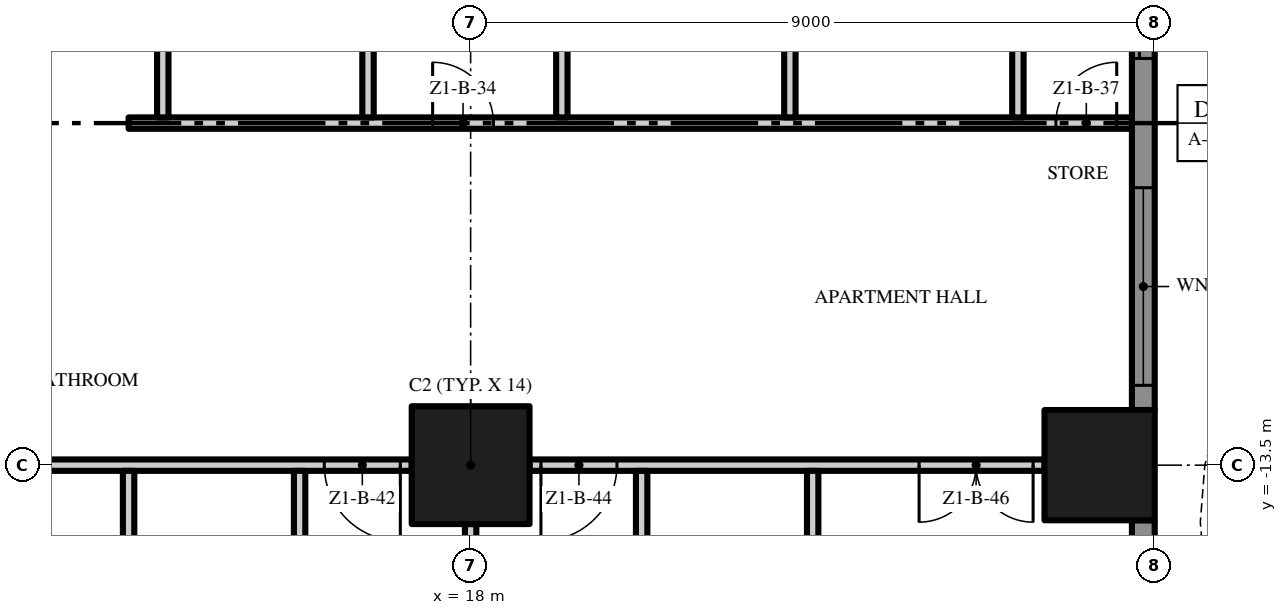
"""IFC4 building model, lengths in metres.
Left out: names, types, materials, properties, quantities, classifications, styles, units other than length and angle.
Written with IfcOpenShell. Run it as: python <this file> out.ifc"""

import sys

from ifc_helpers import new_model, si_unit, direction, frame, frame_2d, origin, origin_2d, place, context, subcontext, project, spatial, polyline, rectangle, outline, extrude, element, fill, save


model = new_model("IFC4")
c1 = context("Model", 3, precision=1e-05, world=origin(), true_north=direction((0.0, 1.0)))
c2 = subcontext(c1, "Body", "Model", "MODEL_VIEW")
j1 = project(units=[si_unit("LENGTHUNIT", "METRE"), si_unit("PLANEANGLEUNIT", "RADIAN")], contexts=[c1])
p1 = place(None, origin())
s1 = spatial("IfcSite", under=j1, at=p1, CompositionType="ELEMENT")
p2 = place(p1, origin())
s2 = spatial("IfcBuilding", under=s1, at=p2, CompositionType="ELEMENT")
p3 = place(p2, frame((0.0, 0.0, 30.2)))
s3 = spatial("IfcBuildingStorey", under=s2, at=p3, CompositionType="ELEMENT", Elevation=30.2)
p4 = place(p3, frame((18.0, -13.5, 0.0), z_axis=(0.0, 0.0, 1.0), x_axis=(1.0, 0.0, 0.0)))
e1 = element("IfcColumn", 1, at=p4, inside=s3, PredefinedType="COLUMN", context=c2, shape_type="SweptSolid", body=[
    extrude(rectangle(XDim=1.55, YDim=1.55, at=origin_2d()), origin(), (0.0, 0.0, 1.0), 3.5),
])
p5 = place(p3, frame((26.275, -13.5, 0.0), z_axis=(0.0, 0.0, 1.0), x_axis=(1.0, 0.0, 0.0)))
e2 = element("IfcColumn", 2, at=p5, inside=s3, PredefinedType="COLUMN", context=c2, shape_type="SweptSolid", body=[
    extrude(rectangle(XDim=1.45, YDim=1.45, at=origin_2d()), origin(), (0.0, 0.0, 1.0), 3.5),
])
p6 = place(p3, frame((26.85, -14.225, 0.0), z_axis=(0.0, 0.0, 1.0), x_axis=(0.0, -1.0, 0.0)))
e3 = element("IfcWall", 3, at=p6, inside=s3, PredefinedType="SOLIDWALL", context=c2, shape_type="SweptSolid", body=[
    extrude(rectangle(XDim=3.475, YDim=0.3, at=frame_2d((1.738, 0.0))), origin(), (0.0, 0.0, 1.0), 3.5),
])
p7 = place(p6, frame((0.325, 0.0, 0.45)))
e4 = element("IfcOpeningElement", 4, at=p7, cuts=e3, PredefinedType="OPENING", context=c2, shape_type="SweptSolid", body=[
    extrude(rectangle(XDim=2.6, YDim=2.65, at=frame_2d((1.3, 1.325))), frame((0.0, 0.16, 0.0), z_axis=(0.0, -1.0, 0.0), x_axis=(1.0, 0.0, 0.0)), (0.0, 0.0, 1.0), 0.32),
])
p8 = place(p3, frame((26.85, -5.225, 0.0), z_axis=(0.0, 0.0, 1.0), x_axis=(0.0, -1.0, 0.0)))
e5 = element("IfcWall", 5, at=p8, inside=s3, PredefinedType="SOLIDWALL", context=c2, shape_type="SweptSolid", body=[
    extrude(rectangle(XDim=7.55, YDim=0.3, at=frame_2d((3.775, 0.0))), origin(), (0.0, 0.0, 1.0), 3.5),
])
p9 = place(p8, frame((4.625, 0.0, 0.45)))
e6 = element("IfcOpeningElement", 6, at=p9, cuts=e5, PredefinedType="OPENING", context=c2, shape_type="SweptSolid", body=[
    extrude(rectangle(XDim=2.6, YDim=2.65, at=frame_2d((1.3, 1.325))), frame((0.0, 0.16, 0.0), z_axis=(0.0, -1.0, 0.0), x_axis=(1.0, 0.0, 0.0)), (0.0, 0.0, 1.0), 0.32),
])
p10 = place(p8, frame((0.325, 0.0, 0.0)))
e7 = element("IfcOpeningElement", 7, at=p10, cuts=e5, PredefinedType="OPENING", context=c2, shape_type="SweptSolid", body=[
    extrude(rectangle(XDim=2.6, YDim=2.4, at=frame_2d((1.3, 1.2))), frame((0.0, 0.16, 0.0), z_axis=(0.0, -1.0, 0.0), x_axis=(1.0, 0.0, 0.0)), (0.0, 0.0, 1.0), 0.32),
])
p11 = place(p3, origin())
e8 = element("IfcWall", 8, at=p11, inside=s3, PredefinedType="USERDEFINED", context=c2, shape_type="SweptSolid", body=[
    extrude(outline(polyline([(28.8, -18.0), (28.095, -16.5), (27.659, -15.0), (27.6, -14.25), (27.659, -13.5), (28.095, -12.0), (28.8, -10.5), (29.505, -9.0), (29.941, -7.5), (30.0, -6.75), (29.941, -6.0), (29.505, -4.5), (28.8, -3.0), (28.095, -1.5), (27.659, 0.0), (27.6, 0.75), (27.659, 1.5), (28.095, 3.0), (28.8, 4.5), (29.505, 6.0), (29.941, 7.5), (30.0, 8.25), (29.941, 9.0), (29.505, 10.5), (28.8, 12.0), (28.095, 13.5), (27.659, 15.0), (27.6, 15.75), (27.659, 16.5), (28.095, 18.0), (27.855, 18.07), (27.411, 16.545), (27.349, 15.75), (27.411, 14.955), (27.86, 13.411), (28.574, 11.894), (29.271, 10.411), (29.694, 8.955), (29.749, 8.25), (29.694, 7.545), (29.271, 6.089), (28.574, 4.606), (27.86, 3.089), (27.411, 1.545), (27.349, 0.75), (27.411, -0.045), (27.86, -1.589), (28.574, -3.106), (29.271, -4.589), (29.694, -6.045), (29.749, -6.75), (29.694, -7.455), (29.271, -8.911), (28.574, -10.394), (27.86, -11.911), (27.411, -13.455), (27.349, -14.25), (27.411, -15.045), (27.86, -16.589), (28.574, -18.106), (28.8, -18.0)])), origin(), (0.0, 0.0, 1.0), 0.9),
])
p12 = place(p3, frame((17.225, -13.5, 0.0), z_axis=(0.0, 0.0, 1.0), x_axis=(-1.0, 0.0, 0.0)))
e9 = element("IfcWall", 9, at=p12, inside=s3, PredefinedType="PARTITIONING", context=c2, shape_type="SweptSolid", body=[
    extrude(rectangle(XDim=7.45, YDim=0.15, at=frame_2d((3.725, 0.0))), origin(), (0.0, 0.0, 1.0), 3.5),
])
p13 = place(p12, frame((6.3, 0.0, 0.0)))
e10 = element("IfcOpeningElement", 10, at=p13, cuts=e9, PredefinedType="OPENING", context=c2, shape_type="SweptSolid", body=[
    extrude(rectangle(XDim=1.0, YDim=2.4, at=frame_2d((0.5, 1.2))), frame((0.0, 0.085, 0.0), z_axis=(0.0, -1.0, 0.0), x_axis=(1.0, 0.0, 0.0)), (0.0, 0.0, 1.0), 0.17),
])
p14 = place(p12, frame((0.15, 0.0, 0.0)))
e11 = element("IfcOpeningElement", 11, at=p14, cuts=e9, PredefinedType="OPENING", context=c2, shape_type="SweptSolid", body=[
    extrude(rectangle(XDim=1.0, YDim=2.4, at=frame_2d((0.5, 1.2))), frame((0.0, 0.085, 0.0), z_axis=(0.0, -1.0, 0.0), x_axis=(1.0, 0.0, 0.0)), (0.0, 0.0, 1.0), 0.17),
])
p15 = place(p3, frame((25.55, -13.5, 0.0), z_axis=(0.0, 0.0, 1.0), x_axis=(-1.0, 0.0, 0.0)))
e12 = element("IfcWall", 12, at=p15, inside=s3, PredefinedType="PARTITIONING", context=c2, shape_type="SweptSolid", body=[
    extrude(rectangle(XDim=6.775, YDim=0.15, at=frame_2d((3.388, 0.0))), origin(), (0.0, 0.0, 1.0), 3.5),
])
p16 = place(p15, frame((5.625, 0.0, 0.0)))
e13 = element("IfcOpeningElement", 13, at=p16, cuts=e12, PredefinedType="OPENING", context=c2, shape_type="SweptSolid", body=[
    extrude(rectangle(XDim=1.0, YDim=2.4, at=frame_2d((0.5, 1.2))), frame((0.0, 0.085, 0.0), z_axis=(0.0, -1.0, 0.0), x_axis=(1.0, 0.0, 0.0)), (0.0, 0.0, 1.0), 0.17),
])
p17 = place(p15, frame((0.15, 0.0, 0.0)))
e14 = element("IfcOpeningElement", 14, at=p17, cuts=e12, PredefinedType="OPENING", context=c2, shape_type="SweptSolid", body=[
    extrude(rectangle(XDim=1.5, YDim=2.4, at=frame_2d((0.75, 1.2))), frame((0.0, 0.085, 0.0), z_axis=(0.0, -1.0, 0.0), x_axis=(1.0, 0.0, 0.0)), (0.0, 0.0, 1.0), 0.17),
])
p18 = place(p3, frame((13.5, -9.0, 0.0), z_axis=(0.0, 0.0, 1.0), x_axis=(1.0, 0.0, 0.0)))
e15 = element("IfcWall", 15, at=p18, inside=s3, PredefinedType="PARTITIONING", context=c2, shape_type="SweptSolid", body=[
    extrude(rectangle(XDim=13.2, YDim=0.15, at=frame_2d((6.6, 0.0))), origin(), (0.0, 0.0, 1.0), 3.5),
])
p19 = place(p18, frame((4.0, 0.0, 0.0)))
e16 = element("IfcOpeningElement", 16, at=p19, cuts=e15, PredefinedType="OPENING", context=c2, shape_type="SweptSolid", body=[
    extrude(rectangle(XDim=0.8, YDim=2.0, at=frame_2d((0.4, 1.0))), frame((0.0, 0.085, 0.0), z_axis=(0.0, -1.0, 0.0), x_axis=(1.0, 0.0, 0.0)), (0.0, 0.0, 1.0), 0.17),
])
p20 = place(p18, frame((12.2, 0.0, 0.0)))
e17 = element("IfcOpeningElement", 17, at=p20, cuts=e15, PredefinedType="OPENING", context=c2, shape_type="SweptSolid", body=[
    extrude(rectangle(XDim=0.8, YDim=2.0, at=frame_2d((0.4, 1.0))), frame((0.0, 0.085, 0.0), z_axis=(0.0, -1.0, 0.0), x_axis=(1.0, 0.0, 0.0)), (0.0, 0.0, 1.0), 0.17),
])
p21 = place(p3, frame((13.5, -22.2, 0.0), z_axis=(0.0, 0.0, 1.0), x_axis=(0.0, 1.0, 0.0)))
e18 = element("IfcWall", 18, at=p21, inside=s3, PredefinedType="PARTITIONING", context=c2, shape_type="SweptSolid", body=[
    extrude(rectangle(XDim=8.625, YDim=0.15, at=frame_2d((4.312, 0.0))), origin(), (0.0, 0.0, 1.0), 3.5),
])
p22 = place(p3, frame((13.95, -8.925, 0.0), z_axis=(0.0, 0.0, 1.0), x_axis=(0.0, 1.0, 0.0)))
e19 = element("IfcWall", 19, at=p22, inside=s3, PredefinedType="PARTITIONING", context=c2, shape_type="SweptSolid", body=[
    extrude(rectangle(XDim=4.5, YDim=0.15, at=frame_2d((2.25, 0.0))), origin(), (0.0, 0.0, 1.0), 3.5),
])
p23 = place(p3, frame((15.75, -16.575, 0.0), z_axis=(0.0, 0.0, 1.0), x_axis=(0.0, 1.0, 0.0)))
e20 = element("IfcWall", 20, at=p23, inside=s3, PredefinedType="PARTITIONING", context=c2, shape_type="SweptSolid", body=[
    extrude(rectangle(XDim=3.0, YDim=0.15, at=frame_2d((1.5, 0.0))), origin(), (0.0, 0.0, 1.0), 3.5),
])
p24 = place(p3, frame((16.65, -8.925, 0.0), z_axis=(0.0, 0.0, 1.0), x_axis=(0.0, 1.0, 0.0)))
e21 = element("IfcWall", 21, at=p24, inside=s3, PredefinedType="PARTITIONING", context=c2, shape_type="SweptSolid", body=[
    extrude(rectangle(XDim=4.35, YDim=0.15, at=frame_2d((2.175, 0.0))), origin(), (0.0, 0.0, 1.0), 3.5),
])
p25 = place(p3, frame((18.0, -21.05, 0.0), z_axis=(0.0, 0.0, 1.0), x_axis=(0.0, 1.0, 0.0)))
e22 = element("IfcWall", 22, at=p25, inside=s3, PredefinedType="PARTITIONING", context=c2, shape_type="SweptSolid", body=[
    extrude(rectangle(XDim=6.775, YDim=0.15, at=frame_2d((3.388, 0.0))), origin(), (0.0, 0.0, 1.0), 3.5),
])
p26 = place(p3, frame((19.2, -8.925, 0.0), z_axis=(0.0, 0.0, 1.0), x_axis=(0.0, 1.0, 0.0)))
e23 = element("IfcWall", 23, at=p26, inside=s3, PredefinedType="PARTITIONING", context=c2, shape_type="SweptSolid", body=[
    extrude(rectangle(XDim=4.35, YDim=0.15, at=frame_2d((2.175, 0.0))), origin(), (0.0, 0.0, 1.0), 3.5),
])
p27 = place(p3, frame((20.25, -16.575, 0.0), z_axis=(0.0, 0.0, 1.0), x_axis=(0.0, 1.0, 0.0)))
e24 = element("IfcWall", 24, at=p27, inside=s3, PredefinedType="PARTITIONING", context=c2, shape_type="SweptSolid", body=[
    extrude(rectangle(XDim=3.0, YDim=0.15, at=frame_2d((1.5, 0.0))), origin(), (0.0, 0.0, 1.0), 3.5),
])
p28 = place(p3, frame((22.2, -8.925, 0.0), z_axis=(0.0, 0.0, 1.0), x_axis=(0.0, 1.0, 0.0)))
e25 = element("IfcWall", 25, at=p28, inside=s3, PredefinedType="PARTITIONING", context=c2, shape_type="SweptSolid", body=[
    extrude(rectangle(XDim=4.35, YDim=0.15, at=frame_2d((2.175, 0.0))), origin(), (0.0, 0.0, 1.0), 3.5),
])
p29 = place(p3, frame((22.5, -17.275, 0.0), z_axis=(0.0, 0.0, 1.0), x_axis=(0.0, 1.0, 0.0)))
e26 = element("IfcWall", 26, at=p29, inside=s3, PredefinedType="PARTITIONING", context=c2, shape_type="SweptSolid", body=[
    extrude(rectangle(XDim=3.7, YDim=0.15, at=frame_2d((1.85, 0.0))), origin(), (0.0, 0.0, 1.0), 3.5),
])
p30 = place(p3, frame((25.2, -8.925, 0.0), z_axis=(0.0, 0.0, 1.0), x_axis=(0.0, 1.0, 0.0)))
e27 = element("IfcWall", 27, at=p30, inside=s3, PredefinedType="PARTITIONING", context=c2, shape_type="SweptSolid", body=[
    extrude(rectangle(XDim=4.35, YDim=0.15, at=frame_2d((2.175, 0.0))), origin(), (0.0, 0.0, 1.0), 3.5),
])
p31 = place(p9, origin())
e28 = element("IfcWindow", 28, at=p31, inside=s3, PartitioningType="SINGLE_PANEL", PredefinedType="WINDOW", context=c2, shape_type="SweptSolid", body=[
    extrude(rectangle(XDim=2.6, YDim=2.65, at=frame_2d((1.3, 1.325))), frame((0.0, 0.03, 0.0), z_axis=(0.0, -1.0, 0.0), x_axis=(1.0, 0.0, 0.0)), (0.0, 0.0, 1.0), 0.06),
])
fill(e6, e28)
p32 = place(p10, origin())
e29 = element("IfcDoor", 29, at=p32, inside=s3, OperationType="SINGLE_SWING_LEFT", PredefinedType="DOOR", context=c2, shape_type="SweptSolid", body=[
    extrude(rectangle(XDim=2.6, YDim=2.4, at=frame_2d((1.3, 1.2))), frame((0.0, 0.025, 0.0), z_axis=(0.0, -1.0, 0.0), x_axis=(1.0, 0.0, 0.0)), (0.0, 0.0, 1.0), 0.05),
])
fill(e7, e29)
p33 = place(p19, origin())
e30 = element("IfcDoor", 30, at=p33, inside=s3, OperationType="SINGLE_SWING_LEFT", PredefinedType="DOOR", context=c2, shape_type="SweptSolid", body=[
    extrude(rectangle(XDim=0.8, YDim=2.0, at=frame_2d((0.4, 1.0))), frame((0.0, 0.025, 0.0), z_axis=(0.0, -1.0, 0.0), x_axis=(1.0, 0.0, 0.0)), (0.0, 0.0, 1.0), 0.05),
])
fill(e16, e30)
p34 = place(p20, origin())
e31 = element("IfcDoor", 31, at=p34, inside=s3, OperationType="SINGLE_SWING_RIGHT", PredefinedType="DOOR", context=c2, shape_type="SweptSolid", body=[
    extrude(rectangle(XDim=0.8, YDim=2.0, at=frame_2d((0.4, 1.0))), frame((0.0, 0.025, 0.0), z_axis=(0.0, -1.0, 0.0), x_axis=(1.0, 0.0, 0.0)), (0.0, 0.0, 1.0), 0.05),
])
fill(e17, e31)
p35 = place(p14, origin())
e32 = element("IfcDoor", 32, at=p35, inside=s3, OperationType="SINGLE_SWING_LEFT", PredefinedType="DOOR", context=c2, shape_type="SweptSolid", body=[
    extrude(rectangle(XDim=1.0, YDim=2.4, at=frame_2d((0.5, 1.2))), frame((0.0, 0.025, 0.0), z_axis=(0.0, -1.0, 0.0), x_axis=(1.0, 0.0, 0.0)), (0.0, 0.0, 1.0), 0.05),
])
fill(e11, e32)
p36 = place(p16, origin())
e33 = element("IfcDoor", 33, at=p36, inside=s3, OperationType="SINGLE_SWING_RIGHT", PredefinedType="DOOR", context=c2, shape_type="SweptSolid", body=[
    extrude(rectangle(XDim=1.0, YDim=2.4, at=frame_2d((0.5, 1.2))), frame((0.0, 0.025, 0.0), z_axis=(0.0, -1.0, 0.0), x_axis=(1.0, 0.0, 0.0)), (0.0, 0.0, 1.0), 0.05),
])
fill(e13, e33)
p37 = place(p17, origin())
e34 = element("IfcDoor", 34, at=p37, inside=s3, OperationType="DOUBLE_DOOR_SINGLE_SWING", PredefinedType="DOOR", context=c2, shape_type="SweptSolid", body=[
    extrude(rectangle(XDim=1.5, YDim=2.4, at=frame_2d((0.75, 1.2))), frame((0.0, 0.025, 0.0), z_axis=(0.0, -1.0, 0.0), x_axis=(1.0, 0.0, 0.0)), (0.0, 0.0, 1.0), 0.05),
])
fill(e14, e34)
save(model, sys.argv[1])
